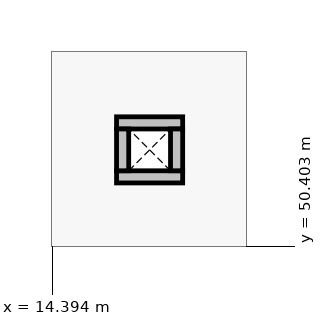
"""IFC4 building model, lengths in metres.
Left out: names, types, materials, properties, quantities, classifications, styles, units other than length and angle.
Written with IfcOpenShell. Run it as: python <this file> out.ifc"""

import sys

from ifc_helpers import new_model, si_unit, direction, frame, frame_2d, origin, place, context, subcontext, project, spatial, rectangle, extrude, element, save


model = new_model("IFC4")
c1 = context("Model", 3, precision=1e-05, world=origin(), true_north=direction((0.0, 1.0)))
c2 = subcontext(c1, "Body", "Model", "MODEL_VIEW")
j1 = project(units=[si_unit("LENGTHUNIT", "METRE"), si_unit("PLANEANGLEUNIT", "RADIAN")], contexts=[c1])
p1 = place(None, origin())
s1 = spatial("IfcSite", under=j1, at=p1, CompositionType="ELEMENT")
p2 = place(p1, origin())
s2 = spatial("IfcBuilding", under=s1, at=p2, CompositionType="ELEMENT")
p3 = place(p2, frame((0.0, 0.0, 4.8)))
s3 = spatial("IfcBuildingStorey", under=s2, at=p3, CompositionType="ELEMENT", Elevation=4.8)
for number, where, z_axis, x_axis in (
    (1, (15.24, 51.32, 0.0), (0.0, 0.0, 1.0), (1.0, 0.0, 0.0)),
    (2, (15.24, 52.03, 0.0), (0.0, 0.0, 1.0), (1.0, 0.0, 0.0)),
):
    element("IfcWall", number, at=place(p3, frame(where, z_axis=z_axis, x_axis=x_axis)), inside=s3, PredefinedType="PARTITIONING", context=c2, shape_type="SweptSolid", body=[
        extrude(rectangle(XDim=0.87, YDim=0.16, at=frame_2d((0.435, 0.0))), origin(), (0.0, 0.0, 1.0), 3.35),
    ])
for number, where, z_axis, x_axis in (
    (3, (15.32, 51.4, 0.0), (0.0, 0.0, 1.0), (0.0, 1.0, 0.0)),
    (4, (16.03, 51.4, 0.0), (0.0, 0.0, 1.0), (0.0, 1.0, 0.0)),
):
    element("IfcWall", number, at=place(p3, frame(where, z_axis=z_axis, x_axis=x_axis)), inside=s3, PredefinedType="PARTITIONING", context=c2, shape_type="SweptSolid", body=[
        extrude(rectangle(XDim=0.55, YDim=0.16, at=frame_2d((0.275, 0.0))), origin(), (0.0, 0.0, 1.0), 3.35),
    ])
save(model, sys.argv[1])
